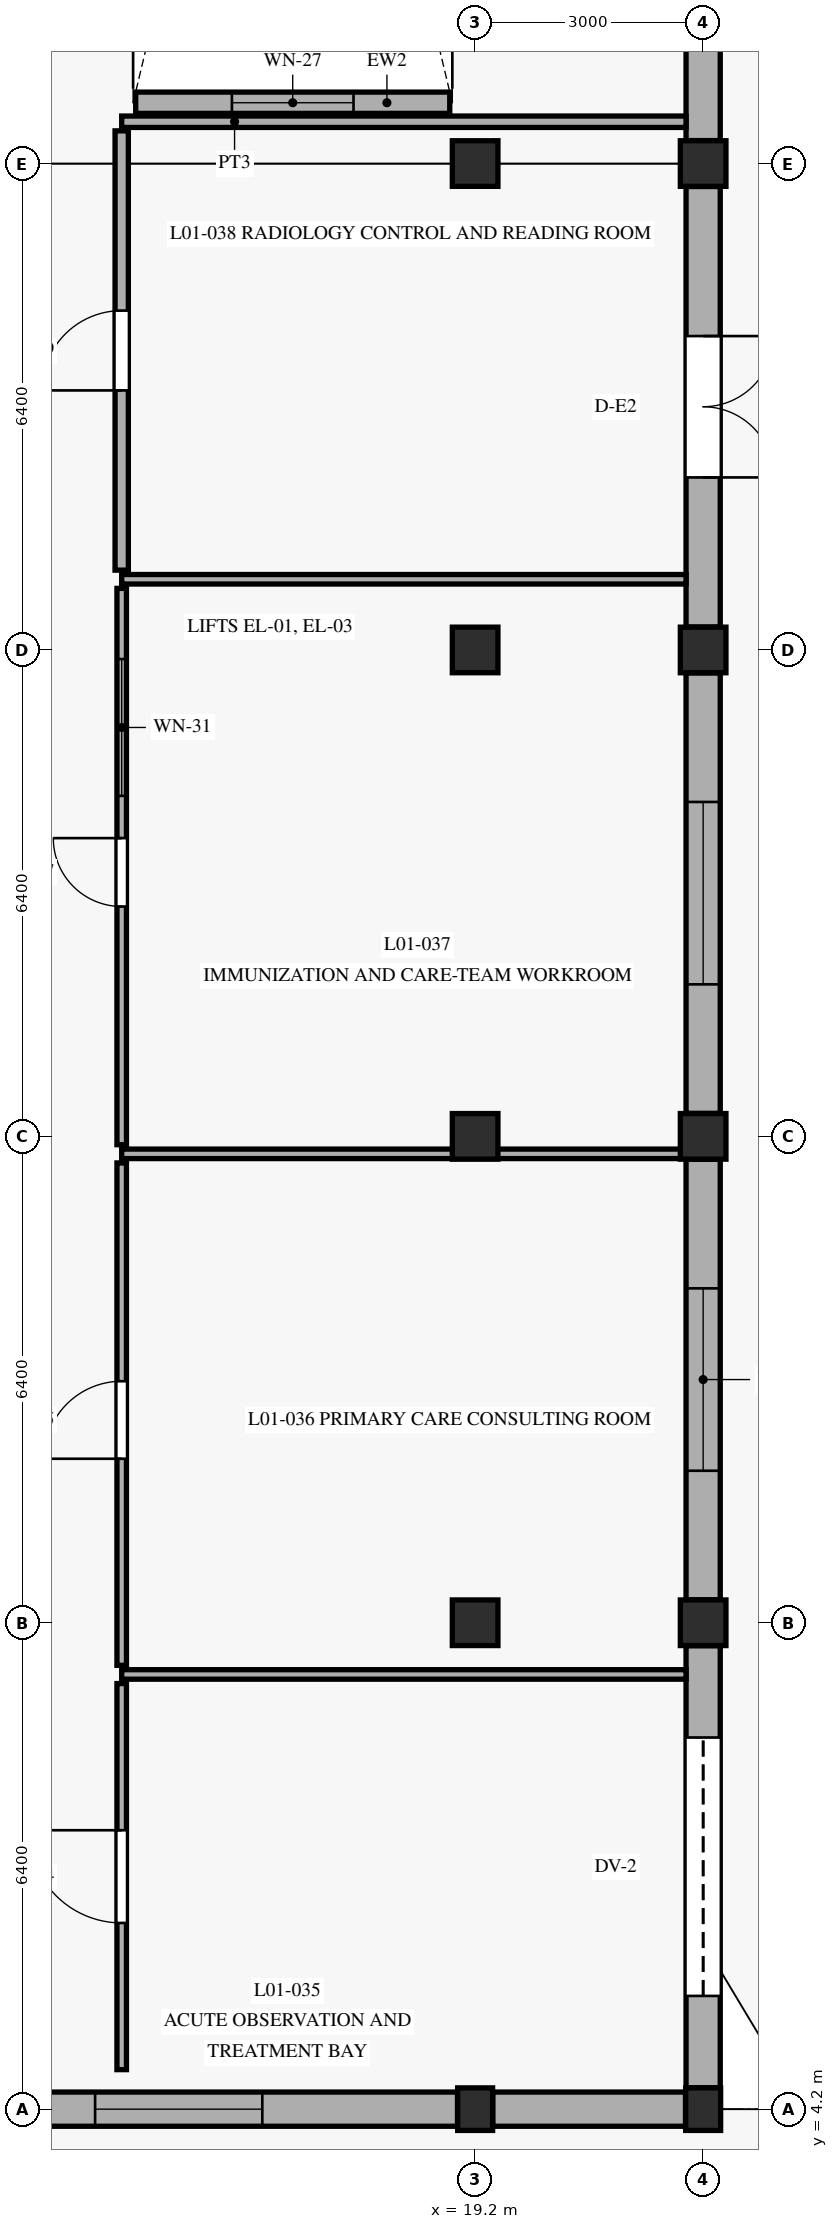
"""IFC4 building model, lengths in metres.
Left out: names, types, materials, properties, quantities, classifications, styles, units other than length and angle.
Written with IfcOpenShell. Run it as: python <this file> out.ifc"""

import sys

from ifc_helpers import new_model, si_unit, direction, frame, frame_2d, origin, origin_with_axes, origin_2d, place, context, subcontext, project, spatial, rectangle, extrude, element, fill, save


model = new_model("IFC4")
c1 = context("Model", 3, precision=1e-05, world=origin(), true_north=direction((0.0, 1.0)))
c2 = subcontext(c1, "Body", "Model", "MODEL_VIEW")
j1 = project(units=[si_unit("LENGTHUNIT", "METRE"), si_unit("PLANEANGLEUNIT", "RADIAN")], contexts=[c1])
p1 = place(None, origin())
s1 = spatial("IfcSite", under=j1, at=p1, CompositionType="ELEMENT")
p2 = place(p1, origin())
s2 = spatial("IfcBuilding", under=s1, at=p2, CompositionType="ELEMENT")
p3 = place(p2, origin())
s3 = spatial("IfcBuildingStorey", under=s2, at=p3, CompositionType="ELEMENT", Elevation=0.0)
p4 = place(p3, frame((19.2, 4.2, 0.0), z_axis=(0.0, 0.0, 1.0), x_axis=(1.0, 0.0, 0.0)))
e1 = element("IfcColumn", 1, at=p4, inside=s3, PredefinedType="COLUMN", context=c2, shape_type="SweptSolid", body=[
    extrude(rectangle(XDim=0.46, YDim=0.56, at=origin_2d()), origin(), (0.0, 0.0, 1.0), 4.8),
])
for number, where, z_axis, x_axis in (
    (2, (19.2, 10.6, 0.0), (0.0, 0.0, 1.0), (1.0, 0.0, 0.0)),
    (3, (19.2, 17.0, 0.0), (0.0, 0.0, 1.0), (1.0, 0.0, 0.0)),
    (4, (19.2, 23.4, 0.0), (0.0, 0.0, 1.0), (1.0, 0.0, 0.0)),
    (5, (19.2, 29.8, 0.0), (0.0, 0.0, 1.0), (1.0, 0.0, 0.0)),
):
    element("IfcColumn", number, at=place(p3, frame(where, z_axis=z_axis, x_axis=x_axis)), inside=s3, PredefinedType="COLUMN", context=c2, shape_type="SweptSolid", body=[
        extrude(rectangle(XDim=0.6, YDim=0.6, at=origin_2d()), origin(), (0.0, 0.0, 1.0), 4.8),
    ])
p5 = place(p3, frame((22.2, 4.2, 0.0), z_axis=(0.0, 0.0, 1.0), x_axis=(1.0, 0.0, 0.0)))
e6 = element("IfcColumn", 6, at=p5, inside=s3, PredefinedType="COLUMN", context=c2, shape_type="SweptSolid", body=[
    extrude(rectangle(XDim=0.46, YDim=0.56, at=origin_2d()), origin(), (0.0, 0.0, 1.0), 4.8),
])
for number, where, z_axis, x_axis in (
    (7, (22.2, 10.6, 0.0), (0.0, 0.0, 1.0), (1.0, 0.0, 0.0)),
    (8, (22.2, 17.0, 0.0), (0.0, 0.0, 1.0), (1.0, 0.0, 0.0)),
    (9, (22.2, 23.4, 0.0), (0.0, 0.0, 1.0), (1.0, 0.0, 0.0)),
    (10, (22.2, 29.8, 0.0), (0.0, 0.0, 1.0), (1.0, 0.0, 0.0)),
):
    element("IfcColumn", number, at=place(p3, frame(where, z_axis=z_axis, x_axis=x_axis)), inside=s3, PredefinedType="COLUMN", context=c2, shape_type="SweptSolid", body=[
        extrude(rectangle(XDim=0.6, YDim=0.6, at=origin_2d()), origin(), (0.0, 0.0, 1.0), 4.8),
    ])
p6 = place(p3, frame((22.2, 4.482, 0.0), z_axis=(0.0, 0.0, 1.0), x_axis=(0.0, 1.0, 0.0)))
e11 = element("IfcWall", 11, at=p6, inside=s3, PredefinedType="SOLIDWALL", context=c2, shape_type="SweptSolid", body=[
    extrude(rectangle(XDim=5.816, YDim=0.45, at=frame_2d((2.908, 0.0))), origin(), (0.0, 0.0, 1.0), 4.09),
])
p7 = place(p6, frame((1.208, 0.0, 0.0)))
e12 = element("IfcOpeningElement", 12, at=p7, cuts=e11, PredefinedType="OPENING", context=c2, shape_type="SweptSolid", body=[
    extrude(rectangle(XDim=3.4, YDim=3.65, at=frame_2d((1.7, 1.825))), frame((0.0, 0.235, 0.0), z_axis=(0.0, -1.0, 0.0), x_axis=(1.0, 0.0, 0.0)), (0.0, 0.0, 1.0), 0.47),
])
p8 = place(p3, frame((22.2, 10.902, 0.0), z_axis=(0.0, 0.0, 1.0), x_axis=(0.0, 1.0, 0.0)))
e13 = element("IfcWall", 13, at=p8, inside=s3, PredefinedType="SOLIDWALL", context=c2, shape_type="SweptSolid", body=[
    extrude(rectangle(XDim=5.796, YDim=0.45, at=frame_2d((2.898, 0.0))), origin(), (0.0, 0.0, 1.0), 4.09),
])
p9 = place(p8, frame((1.698, 0.0, 0.6)))
e14 = element("IfcOpeningElement", 14, at=p9, cuts=e13, PredefinedType="OPENING", context=c2, shape_type="SweptSolid", body=[
    extrude(rectangle(XDim=2.4, YDim=2.5, at=frame_2d((1.2, 1.25))), frame((0.0, 0.235, 0.0), z_axis=(0.0, -1.0, 0.0), x_axis=(1.0, 0.0, 0.0)), (0.0, 0.0, 1.0), 0.47),
])
p10 = place(p3, frame((22.2, 17.302, 0.0), z_axis=(0.0, 0.0, 1.0), x_axis=(0.0, 1.0, 0.0)))
e15 = element("IfcWall", 15, at=p10, inside=s3, PredefinedType="SOLIDWALL", context=c2, shape_type="SweptSolid", body=[
    extrude(rectangle(XDim=5.796, YDim=0.45, at=frame_2d((2.898, 0.0))), origin(), (0.0, 0.0, 1.0), 4.09),
])
p11 = place(p10, frame((1.698, 0.0, 0.6)))
e16 = element("IfcOpeningElement", 16, at=p11, cuts=e15, PredefinedType="OPENING", context=c2, shape_type="SweptSolid", body=[
    extrude(rectangle(XDim=2.4, YDim=2.5, at=frame_2d((1.2, 1.25))), frame((0.0, 0.235, 0.0), z_axis=(0.0, -1.0, 0.0), x_axis=(1.0, 0.0, 0.0)), (0.0, 0.0, 1.0), 0.47),
])
p12 = place(p3, frame((22.2, 23.702, 0.0), z_axis=(0.0, 0.0, 1.0), x_axis=(0.0, 1.0, 0.0)))
e17 = element("IfcWall", 17, at=p12, inside=s3, PredefinedType="SOLIDWALL", context=c2, shape_type="SweptSolid", body=[
    extrude(rectangle(XDim=5.796, YDim=0.45, at=frame_2d((2.898, 0.0))), origin(), (0.0, 0.0, 1.0), 4.09),
])
p13 = place(p12, frame((1.968, 0.0, 0.0)))
e18 = element("IfcOpeningElement", 18, at=p13, cuts=e17, PredefinedType="OPENING", context=c2, shape_type="SweptSolid", body=[
    extrude(rectangle(XDim=1.86, YDim=2.5, at=frame_2d((0.93, 1.25))), frame((0.0, 0.235, 0.0), z_axis=(0.0, -1.0, 0.0), x_axis=(1.0, 0.0, 0.0)), (0.0, 0.0, 1.0), 0.47),
])
p14 = place(p3, frame((22.2, 30.102, 0.0), z_axis=(0.0, 0.0, 1.0), x_axis=(0.0, 1.0, 0.0)))
e19 = element("IfcWall", 19, at=p14, inside=s3, PredefinedType="SOLIDWALL", context=c2, shape_type="SweptSolid", body=[
    extrude(rectangle(XDim=5.796, YDim=0.45, at=frame_2d((2.898, 0.0))), origin(), (0.0, 0.0, 1.0), 4.09),
])
p15 = place(p14, frame((1.698, 0.0, 0.6)))
e20 = element("IfcOpeningElement", 20, at=p15, cuts=e19, PredefinedType="OPENING", context=c2, shape_type="SweptSolid", body=[
    extrude(rectangle(XDim=2.4, YDim=2.5, at=frame_2d((1.2, 1.25))), frame((0.0, 0.235, 0.0), z_axis=(0.0, -1.0, 0.0), x_axis=(1.0, 0.0, 0.0)), (0.0, 0.0, 1.0), 0.47),
])
p16 = place(p3, frame((11.632, 4.2, 0.0), z_axis=(0.0, 0.0, 1.0), x_axis=(1.0, 0.0, 0.0)))
e21 = element("IfcWall", 21, at=p16, inside=s3, PredefinedType="SOLIDWALL", context=c2, shape_type="SweptSolid", body=[
    extrude(rectangle(XDim=7.336, YDim=0.45, at=frame_2d((3.668, 0.0))), origin(), (0.0, 0.0, 1.0), 3.92),
])
p17 = place(p16, frame((2.568, 0.0, 2.6)))
e22 = element("IfcOpeningElement", 22, at=p17, cuts=e21, PredefinedType="OPENING", context=c2, shape_type="SweptSolid", body=[
    extrude(rectangle(XDim=2.2, YDim=1.1, at=frame_2d((1.1, 0.55))), frame((0.0, 0.235, 0.0), z_axis=(0.0, -1.0, 0.0), x_axis=(1.0, 0.0, 0.0)), (0.0, 0.0, 1.0), 0.47),
])
p18 = place(p3, frame((19.432, 4.2, 0.0), z_axis=(0.0, 0.0, 1.0), x_axis=(1.0, 0.0, 0.0)))
e23 = element("IfcWall", 23, at=p18, inside=s3, PredefinedType="SOLIDWALL", context=c2, shape_type="SweptSolid", body=[
    extrude(rectangle(XDim=2.536, YDim=0.45, at=frame_2d((1.268, 0.0))), origin(), (0.0, 0.0, 1.0), 3.92),
])
p19 = place(p3, frame((18.866, 30.6, 0.0), z_axis=(0.0, 0.0, 1.0), x_axis=(-1.0, 0.0, 0.0)))
e24 = element("IfcWall", 24, at=p19, inside=s3, PredefinedType="SOLIDWALL", context=c2, shape_type="SweptSolid", body=[
    extrude(rectangle(XDim=4.132, YDim=0.28, at=frame_2d((2.066, 0.0))), origin(), (0.0, 0.0, 1.0), 4.42),
])
p20 = place(p19, frame((1.266, 0.0, 0.85)))
e25 = element("IfcOpeningElement", 25, at=p20, cuts=e24, PredefinedType="OPENING", context=c2, shape_type="SweptSolid", body=[
    extrude(rectangle(XDim=1.6, YDim=1.8, at=frame_2d((0.8, 0.9))), frame((0.0, 0.15, 0.0), z_axis=(0.0, -1.0, 0.0), x_axis=(1.0, 0.0, 0.0)), (0.0, 0.0, 1.0), 0.3),
])
p21 = place(p3, frame((14.55, 4.72, 0.0), z_axis=(0.0, 0.0, 1.0), x_axis=(0.0, 1.0, 0.0)))
e26 = element("IfcWall", 26, at=p21, inside=s3, PredefinedType="PARTITIONING", context=c2, shape_type="SweptSolid", body=[
    extrude(rectangle(XDim=5.08, YDim=0.125, at=frame_2d((2.54, 0.0))), origin(), (0.0, 0.0, 1.0), 4.415),
])
p22 = place(p21, frame((1.93, 0.0, 0.0)))
e27 = element("IfcOpeningElement", 27, at=p22, cuts=e26, PredefinedType="OPENING", context=c2, shape_type="SweptSolid", body=[
    extrude(rectangle(XDim=1.22, YDim=2.2, at=frame_2d((0.61, 1.1))), frame((0.0, 0.073, 0.0), z_axis=(0.0, -1.0, 0.0), x_axis=(1.0, 0.0, 0.0)), (0.0, 0.0, 1.0), 0.145),
])
p23 = place(p3, frame((14.55, 9.92, 0.0), z_axis=(0.0, 0.0, 1.0), x_axis=(1.0, 0.0, 0.0)))
e28 = element("IfcWall", 28, at=p23, inside=s3, PredefinedType="PARTITIONING", context=c2, shape_type="SweptSolid", body=[
    extrude(rectangle(XDim=7.425, YDim=0.125, at=frame_2d((3.712, 0.0))), origin(), (0.0, 0.0, 1.0), 3.895),
])
p24 = place(p3, frame((14.55, 10.04, 0.0), z_axis=(0.0, 0.0, 1.0), x_axis=(0.0, 1.0, 0.0)))
e29 = element("IfcWall", 29, at=p24, inside=s3, PredefinedType="PARTITIONING", context=c2, shape_type="SweptSolid", body=[
    extrude(rectangle(XDim=6.61, YDim=0.125, at=frame_2d((3.305, 0.0))), origin(), (0.0, 0.0, 1.0), 4.015),
])
p25 = place(p24, frame((2.718, 0.0, 0.0)))
e30 = element("IfcOpeningElement", 30, at=p25, cuts=e29, PredefinedType="OPENING", context=c2, shape_type="SweptSolid", body=[
    extrude(rectangle(XDim=1.02, YDim=2.18, at=frame_2d((0.51, 1.09))), frame((0.0, 0.073, 0.0), z_axis=(0.0, -1.0, 0.0), x_axis=(1.0, 0.0, 0.0)), (0.0, 0.0, 1.0), 0.145),
])
p26 = place(p3, frame((14.55, 16.77, 0.0), z_axis=(0.0, 0.0, 1.0), x_axis=(1.0, 0.0, 0.0)))
e31 = element("IfcWall", 31, at=p26, inside=s3, PredefinedType="PARTITIONING", context=c2, shape_type="SweptSolid", body=[
    extrude(rectangle(XDim=7.425, YDim=0.125, at=frame_2d((3.712, 0.0))), origin(), (0.0, 0.0, 1.0), 3.895),
])
p27 = place(p3, frame((14.55, 16.89, 0.0), z_axis=(0.0, 0.0, 1.0), x_axis=(0.0, 1.0, 0.0)))
e32 = element("IfcWall", 32, at=p27, inside=s3, PredefinedType="PARTITIONING", context=c2, shape_type="SweptSolid", body=[
    extrude(rectangle(XDim=7.32, YDim=0.125, at=frame_2d((3.66, 0.0))), origin(), (0.0, 0.0, 1.0), 4.015),
])
p28 = place(p27, frame((3.134, 0.0, 0.0)))
e33 = element("IfcOpeningElement", 33, at=p28, cuts=e32, PredefinedType="OPENING", context=c2, shape_type="SweptSolid", body=[
    extrude(rectangle(XDim=0.9, YDim=2.12, at=frame_2d((0.45, 1.06))), frame((0.0, 0.073, 0.0), z_axis=(0.0, -1.0, 0.0), x_axis=(1.0, 0.0, 0.0)), (0.0, 0.0, 1.0), 0.145),
])
p29 = place(p27, frame((4.59, 0.0, 1.05)))
e34 = element("IfcOpeningElement", 34, at=p29, cuts=e32, PredefinedType="OPENING", context=c2, shape_type="SweptSolid", body=[
    extrude(rectangle(XDim=1.8, YDim=1.25, at=frame_2d((0.9, 0.625))), frame((0.0, 0.073, 0.0), z_axis=(0.0, -1.0, 0.0), x_axis=(1.0, 0.0, 0.0)), (0.0, 0.0, 1.0), 0.145),
])
p30 = place(p3, frame((14.55, 24.33, 0.0), z_axis=(0.0, 0.0, 1.0), x_axis=(1.0, 0.0, 0.0)))
e35 = element("IfcWall", 35, at=p30, inside=s3, PredefinedType="PARTITIONING", context=c2, shape_type="SweptSolid", body=[
    extrude(rectangle(XDim=7.425, YDim=0.125, at=frame_2d((3.712, 0.0))), origin(), (0.0, 0.0, 1.0), 3.895),
])
p31 = place(p3, frame((14.55, 24.45, 0.0), z_axis=(0.0, 0.0, 1.0), x_axis=(0.0, 1.0, 0.0)))
e36 = element("IfcWall", 36, at=p31, inside=s3, PredefinedType="PARTITIONING", context=c2, shape_type="SweptSolid", body=[
    extrude(rectangle(XDim=5.78, YDim=0.175, at=frame_2d((2.89, 0.0))), origin(), (0.0, 0.0, 1.0), 4.015),
])
p32 = place(p31, frame((2.365, 0.0, 0.0)))
e37 = element("IfcOpeningElement", 37, at=p32, cuts=e36, PredefinedType="OPENING", context=c2, shape_type="SweptSolid", body=[
    extrude(rectangle(XDim=1.05, YDim=2.24, at=frame_2d((0.525, 1.12))), frame((0.0, 0.098, 0.0), z_axis=(0.0, -1.0, 0.0), x_axis=(1.0, 0.0, 0.0)), (0.0, 0.0, 1.0), 0.195),
])
p33 = place(p3, frame((14.55, 30.35, 0.0), z_axis=(0.0, 0.0, 1.0), x_axis=(1.0, 0.0, 0.0)))
e38 = element("IfcWall", 38, at=p33, inside=s3, PredefinedType="PARTITIONING", context=c2, shape_type="SweptSolid", body=[
    extrude(rectangle(XDim=7.425, YDim=0.15, at=frame_2d((3.712, 0.0))), origin(), (0.0, 0.0, 1.0), 3.895),
])
p34 = place(p7, frame((3.4, 0.0, 0.0), z_axis=(0.0, 0.0, 1.0), x_axis=(-1.0, 0.0, 0.0)))
e39 = element("IfcDoor", 39, at=p34, inside=s3, OperationType="ROLLINGUP", PredefinedType="GATE", context=c2, shape_type="SweptSolid", body=[
    extrude(rectangle(XDim=3.4, YDim=3.65, at=frame_2d((1.7, 1.825))), frame((0.0, 0.025, 0.0), z_axis=(0.0, -1.0, 0.0), x_axis=(1.0, 0.0, 0.0)), (0.0, 0.0, 1.0), 0.05),
])
fill(e12, e39)
p35 = place(p9, origin_with_axes())
e40 = element("IfcWindow", 40, at=p35, inside=s3, PartitioningType="SINGLE_PANEL", PredefinedType="WINDOW", context=c2, shape_type="SweptSolid", body=[
    extrude(rectangle(XDim=2.4, YDim=2.5, at=frame_2d((1.2, 1.25))), frame((0.0, 0.03, 0.0), z_axis=(0.0, -1.0, 0.0), x_axis=(1.0, 0.0, 0.0)), (0.0, 0.0, 1.0), 0.06),
])
fill(e14, e40)
p36 = place(p11, origin_with_axes())
e41 = element("IfcWindow", 41, at=p36, inside=s3, PartitioningType="SINGLE_PANEL", PredefinedType="WINDOW", context=c2, shape_type="SweptSolid", body=[
    extrude(rectangle(XDim=2.4, YDim=2.5, at=frame_2d((1.2, 1.25))), frame((0.0, 0.03, 0.0), z_axis=(0.0, -1.0, 0.0), x_axis=(1.0, 0.0, 0.0)), (0.0, 0.0, 1.0), 0.06),
])
fill(e16, e41)
p37 = place(p13, frame((1.86, 0.0, 0.0), z_axis=(0.0, 0.0, 1.0), x_axis=(-1.0, 0.0, 0.0)))
e42 = element("IfcDoor", 42, at=p37, inside=s3, OperationType="DOUBLE_DOOR_SINGLE_SWING", PredefinedType="DOOR", context=c2, shape_type="SweptSolid", body=[
    extrude(rectangle(XDim=1.86, YDim=2.5, at=frame_2d((0.93, 1.25))), frame((0.0, 0.025, 0.0), z_axis=(0.0, -1.0, 0.0), x_axis=(1.0, 0.0, 0.0)), (0.0, 0.0, 1.0), 0.05),
])
fill(e18, e42)
p38 = place(p17, origin_with_axes())
e43 = element("IfcWindow", 43, at=p38, inside=s3, PartitioningType="SINGLE_PANEL", PredefinedType="WINDOW", context=c2, shape_type="SweptSolid", body=[
    extrude(rectangle(XDim=2.2, YDim=1.1, at=frame_2d((1.1, 0.55))), frame((0.0, 0.03, 0.0), z_axis=(0.0, -1.0, 0.0), x_axis=(1.0, 0.0, 0.0)), (0.0, 0.0, 1.0), 0.06),
])
fill(e22, e43)
p39 = place(p20, origin_with_axes())
e44 = element("IfcWindow", 44, at=p39, inside=s3, PartitioningType="SINGLE_PANEL", PredefinedType="WINDOW", context=c2, shape_type="SweptSolid", body=[
    extrude(rectangle(XDim=1.6, YDim=1.8, at=frame_2d((0.8, 0.9))), frame((0.0, 0.03, 0.0), z_axis=(0.0, -1.0, 0.0), x_axis=(1.0, 0.0, 0.0)), (0.0, 0.0, 1.0), 0.06),
])
fill(e25, e44)
p40 = place(p22, frame((1.22, 0.0, 0.0), z_axis=(0.0, 0.0, 1.0), x_axis=(-1.0, 0.0, 0.0)))
e45 = element("IfcDoor", 45, at=p40, inside=s3, OperationType="SINGLE_SWING_LEFT", PredefinedType="DOOR", context=c2, shape_type="SweptSolid", body=[
    extrude(rectangle(XDim=1.22, YDim=2.2, at=frame_2d((0.61, 1.1))), frame((0.0, 0.025, 0.0), z_axis=(0.0, -1.0, 0.0), x_axis=(1.0, 0.0, 0.0)), (0.0, 0.0, 1.0), 0.05),
])
fill(e27, e45)
p41 = place(p25, frame((1.02, 0.0, 0.0), z_axis=(0.0, 0.0, 1.0), x_axis=(-1.0, 0.0, 0.0)))
e46 = element("IfcDoor", 46, at=p41, inside=s3, OperationType="SINGLE_SWING_RIGHT", PredefinedType="DOOR", context=c2, shape_type="SweptSolid", body=[
    extrude(rectangle(XDim=1.02, YDim=2.18, at=frame_2d((0.51, 1.09))), frame((0.0, 0.025, 0.0), z_axis=(0.0, -1.0, 0.0), x_axis=(1.0, 0.0, 0.0)), (0.0, 0.0, 1.0), 0.05),
])
fill(e30, e46)
p42 = place(p28, frame((0.9, 0.0, 0.0), z_axis=(0.0, 0.0, 1.0), x_axis=(-1.0, 0.0, 0.0)))
e47 = element("IfcDoor", 47, at=p42, inside=s3, OperationType="SINGLE_SWING_LEFT", PredefinedType="DOOR", context=c2, shape_type="SweptSolid", body=[
    extrude(rectangle(XDim=0.9, YDim=2.12, at=frame_2d((0.45, 1.06))), frame((0.0, 0.025, 0.0), z_axis=(0.0, -1.0, 0.0), x_axis=(1.0, 0.0, 0.0)), (0.0, 0.0, 1.0), 0.05),
])
fill(e33, e47)
p43 = place(p29, origin_with_axes())
e48 = element("IfcWindow", 48, at=p43, inside=s3, PartitioningType="SINGLE_PANEL", PredefinedType="WINDOW", context=c2, shape_type="SweptSolid", body=[
    extrude(rectangle(XDim=1.8, YDim=1.25, at=frame_2d((0.9, 0.625))), frame((0.0, 0.03, 0.0), z_axis=(0.0, -1.0, 0.0), x_axis=(1.0, 0.0, 0.0)), (0.0, 0.0, 1.0), 0.06),
])
fill(e34, e48)
p44 = place(p32, frame((1.05, 0.0, 0.0), z_axis=(0.0, 0.0, 1.0), x_axis=(-1.0, 0.0, 0.0)))
e49 = element("IfcDoor", 49, at=p44, inside=s3, OperationType="SINGLE_SWING_RIGHT", PredefinedType="DOOR", context=c2, shape_type="SweptSolid", body=[
    extrude(rectangle(XDim=1.05, YDim=2.24, at=frame_2d((0.525, 1.12))), frame((0.0, 0.025, 0.0), z_axis=(0.0, -1.0, 0.0), x_axis=(1.0, 0.0, 0.0)), (0.0, 0.0, 1.0), 0.05),
])
fill(e37, e49)
save(model, sys.argv[1])
